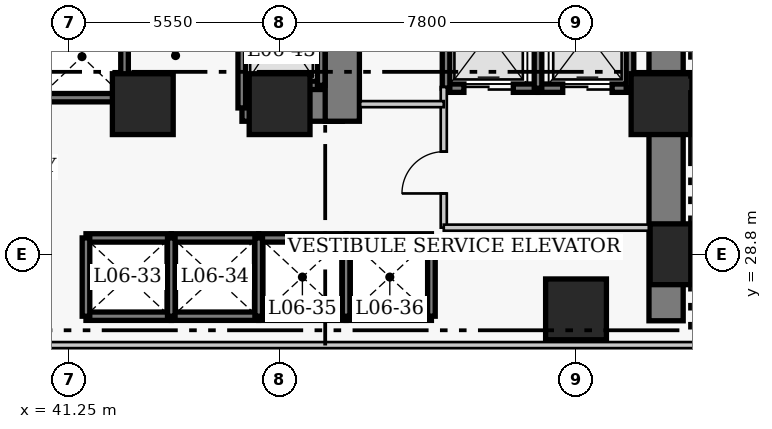
"""IFC4 building model, lengths in metres.
Left out: names, types, materials, properties, quantities, classifications, styles, units other than length and angle.
Written with IfcOpenShell. Run it as: python <this file> out.ifc"""

import sys

from ifc_helpers import new_model, si_unit, direction, frame, frame_2d, origin, origin_2d, place, context, subcontext, project, spatial, rectangle, extrude, element, fill, save


model = new_model("IFC4")
c1 = context("Model", 3, precision=1e-05, world=origin(), true_north=direction((0.0, 1.0)))
c2 = subcontext(c1, "Body", "Model", "MODEL_VIEW")
j1 = project(units=[si_unit("LENGTHUNIT", "METRE"), si_unit("PLANEANGLEUNIT", "RADIAN")], contexts=[c1])
p1 = place(None, origin())
s1 = spatial("IfcSite", under=j1, at=p1, CompositionType="ELEMENT")
p2 = place(p1, origin())
s2 = spatial("IfcBuilding", under=s1, at=p2, CompositionType="ELEMENT")
p3 = place(p2, frame((0.0, 0.0, 29.8)))
s3 = spatial("IfcBuildingStorey", under=s2, at=p3, CompositionType="ELEMENT", Elevation=29.8)
p4 = place(p3, frame((56.97, 27.05, 0.0), z_axis=(0.0, 0.0, 1.0), x_axis=(0.0, 1.0, 0.0)))
e1 = element("IfcWall", 1, at=p4, inside=s3, PredefinedType="SHEAR", context=c2, shape_type="SweptSolid", body=[
    extrude(rectangle(XDim=13.72, YDim=0.9, at=frame_2d((6.86, 0.0))), origin(), (0.0, 0.0, 1.0), 3.8),
])
p5 = place(p3, frame((45.81, 32.75, 0.0), z_axis=(0.0, 0.0, 1.0), x_axis=(1.0, 0.0, 0.0)))
e2 = element("IfcWall", 2, at=p5, inside=s3, PredefinedType="SHEAR", context=c2, shape_type="SweptSolid", body=[
    extrude(rectangle(XDim=2.64, YDim=0.9, at=frame_2d((1.32, 0.0))), origin(), (0.0, 0.0, 1.0), 3.8),
])
p6 = place(p3, frame((48.45, 32.3, 0.0), z_axis=(0.0, 0.0, 1.0), x_axis=(0.0, 1.0, 0.0)))
e3 = element("IfcWall", 3, at=p6, inside=s3, PredefinedType="SHEAR", context=c2, shape_type="SweptSolid", body=[
    extrude(rectangle(XDim=8.02, YDim=0.9, at=frame_2d((4.01, 0.0))), origin(), (0.0, 0.0, 1.0), 3.8),
])
p7 = place(p6, frame((5.9, 0.0, 0.0)))
e4 = element("IfcOpeningElement", 4, at=p7, cuts=e3, PredefinedType="OPENING", context=c2, shape_type="SweptSolid", body=[
    extrude(rectangle(XDim=1.1, YDim=2.15, at=frame_2d((0.55, 1.075))), frame((0.0, 0.46, 0.0), z_axis=(0.0, -1.0, 0.0), x_axis=(1.0, 0.0, 0.0)), (0.0, 0.0, 1.0), 0.92),
])
for number, where, z_axis, x_axis in (
    (5, (57.35, 28.8, 0.0), (0.0, 0.0, 1.0), (1.0, 0.0, 0.0)),
    (6, (43.2, 32.75, 0.0), (0.0, 0.0, 1.0), (1.0, 0.0, 0.0)),
    (7, (46.8, 32.75, 0.0), (0.0, 0.0, 1.0), (1.0, 0.0, 0.0)),
    (8, (54.6, 27.35, 0.0), (0.0, 0.0, 1.0), (1.0, 0.0, 0.0)),
    (9, (56.85, 32.75, 0.0), (0.0, 0.0, 1.0), (1.0, 0.0, 0.0)),
):
    element("IfcColumn", number, at=place(p3, frame(where, z_axis=z_axis, x_axis=x_axis)), inside=s3, PredefinedType="COLUMN", context=c2, shape_type="SweptSolid", body=[
        extrude(rectangle(XDim=1.6, YDim=1.6, at=origin_2d()), origin(), (0.0, 0.0, 1.0), 3.8),
    ])
for number, where, z_axis, x_axis in (
    (10, (41.705, 29.23, 0.0), (0.0, 0.0, 1.0), (1.0, 0.0, 0.0)),
    (11, (41.705, 27.17, 0.0), (0.0, 0.0, 1.0), (1.0, 0.0, 0.0)),
):
    element("IfcWall", number, at=place(p3, frame(where, z_axis=z_axis, x_axis=x_axis)), inside=s3, PredefinedType="SHEAR", context=c2, shape_type="SweptSolid", body=[
        extrude(rectangle(XDim=2.245, YDim=0.22, at=frame_2d((1.123, 0.0))), origin(), (0.0, 0.0, 1.0), 3.8),
    ])
p8 = place(p3, frame((41.705, 27.17, 0.0), z_axis=(0.0, 0.0, 1.0), x_axis=(0.0, 1.0, 0.0)))
e12 = element("IfcWall", 12, at=p8, inside=s3, PredefinedType="SHEAR", context=c2, shape_type="SweptSolid", body=[
    extrude(rectangle(XDim=2.06, YDim=0.2, at=frame_2d((1.03, 0.0))), origin(), (0.0, 0.0, 1.0), 3.8),
])
for number, where, z_axis, x_axis in (
    (13, (43.95, 29.23, 0.0), (0.0, 0.0, 1.0), (1.0, 0.0, 0.0)),
    (14, (43.95, 27.17, 0.0), (0.0, 0.0, 1.0), (1.0, 0.0, 0.0)),
):
    element("IfcWall", number, at=place(p3, frame(where, z_axis=z_axis, x_axis=x_axis)), inside=s3, PredefinedType="SHEAR", context=c2, shape_type="SweptSolid", body=[
        extrude(rectangle(XDim=2.3, YDim=0.22, at=frame_2d((1.15, 0.0))), origin(), (0.0, 0.0, 1.0), 3.8),
    ])
p9 = place(p3, frame((43.95, 27.17, 0.0), z_axis=(0.0, 0.0, 1.0), x_axis=(0.0, 1.0, 0.0)))
e15 = element("IfcWall", 15, at=p9, inside=s3, PredefinedType="SHEAR", context=c2, shape_type="SweptSolid", body=[
    extrude(rectangle(XDim=2.06, YDim=0.2, at=frame_2d((1.03, 0.0))), origin(), (0.0, 0.0, 1.0), 3.8),
])
for number, where, z_axis, x_axis in (
    (16, (46.25, 29.23, 0.0), (0.0, 0.0, 1.0), (1.0, 0.0, 0.0)),
    (17, (46.25, 27.17, 0.0), (0.0, 0.0, 1.0), (1.0, 0.0, 0.0)),
):
    element("IfcWall", number, at=place(p3, frame(where, z_axis=z_axis, x_axis=x_axis)), inside=s3, PredefinedType="SHEAR", context=c2, shape_type="SweptSolid", body=[
        extrude(rectangle(XDim=2.3, YDim=0.22, at=frame_2d((1.15, 0.0))), origin(), (0.0, 0.0, 1.0), 3.8),
    ])
p10 = place(p3, frame((46.25, 27.17, 0.0), z_axis=(0.0, 0.0, 1.0), x_axis=(0.0, 1.0, 0.0)))
e18 = element("IfcWall", 18, at=p10, inside=s3, PredefinedType="SHEAR", context=c2, shape_type="SweptSolid", body=[
    extrude(rectangle(XDim=2.06, YDim=0.2, at=frame_2d((1.03, 0.0))), origin(), (0.0, 0.0, 1.0), 3.8),
])
for number, where, z_axis, x_axis in (
    (19, (48.55, 29.23, 0.0), (0.0, 0.0, 1.0), (1.0, 0.0, 0.0)),
    (20, (48.55, 27.17, 0.0), (0.0, 0.0, 1.0), (1.0, 0.0, 0.0)),
):
    element("IfcWall", number, at=place(p3, frame(where, z_axis=z_axis, x_axis=x_axis)), inside=s3, PredefinedType="SHEAR", context=c2, shape_type="SweptSolid", body=[
        extrude(rectangle(XDim=2.245, YDim=0.22, at=frame_2d((1.123, 0.0))), origin(), (0.0, 0.0, 1.0), 3.8),
    ])
for number, where, z_axis, x_axis in (
    (21, (48.55, 27.17, 0.0), (0.0, 0.0, 1.0), (0.0, 1.0, 0.0)),
    (22, (50.795, 27.17, 0.0), (0.0, 0.0, 1.0), (0.0, 1.0, 0.0)),
):
    element("IfcWall", number, at=place(p3, frame(where, z_axis=z_axis, x_axis=x_axis)), inside=s3, PredefinedType="SHEAR", context=c2, shape_type="SweptSolid", body=[
        extrude(rectangle(XDim=2.06, YDim=0.2, at=frame_2d((1.03, 0.0))), origin(), (0.0, 0.0, 1.0), 3.8),
    ])
p11 = place(p3, frame((40.4, 32.92, 0.0), z_axis=(0.0, 0.0, 1.0), x_axis=(1.0, 0.0, 0.0)))
e23 = element("IfcWall", 23, at=p11, inside=s3, PredefinedType="SHEAR", context=c2, shape_type="SweptSolid", body=[
    extrude(rectangle(XDim=2.32, YDim=0.22, at=frame_2d((1.16, 0.0))), origin(), (0.0, 0.0, 1.0), 3.8),
])
p12 = place(p3, frame((42.72, 32.92, 0.0), z_axis=(0.0, 0.0, 1.0), x_axis=(0.0, 1.0, 0.0)))
e24 = element("IfcWall", 24, at=p12, inside=s3, PredefinedType="SHEAR", context=c2, shape_type="SweptSolid", body=[
    extrude(rectangle(XDim=2.16, YDim=0.2, at=frame_2d((1.08, 0.0))), origin(), (0.0, 0.0, 1.0), 3.8),
])
p13 = place(p3, frame((51.18, 33.17, 0.0), z_axis=(0.0, 0.0, 1.0), x_axis=(1.0, 0.0, 0.0)))
e25 = element("IfcWall", 25, at=p13, inside=s3, PredefinedType="SHEAR", context=c2, shape_type="SweptSolid", body=[
    extrude(rectangle(XDim=2.42, YDim=0.22, at=frame_2d((1.21, 0.0))), origin(), (0.0, 0.0, 1.0), 3.8),
])
p14 = place(p13, frame((0.47, 0.0, 0.0)))
e26 = element("IfcOpeningElement", 26, at=p14, cuts=e25, PredefinedType="OPENING", context=c2, shape_type="SweptSolid", body=[
    extrude(rectangle(XDim=1.3, YDim=2.15, at=frame_2d((0.65, 1.075))), frame((0.0, 0.12, 0.0), z_axis=(0.0, -1.0, 0.0), x_axis=(1.0, 0.0, 0.0)), (0.0, 0.0, 1.0), 0.24),
])
p15 = place(p3, frame((51.18, 33.17, 0.0), z_axis=(0.0, 0.0, 1.0), x_axis=(0.0, 1.0, 0.0)))
e27 = element("IfcWall", 27, at=p15, inside=s3, PredefinedType="SHEAR", context=c2, shape_type="SweptSolid", body=[
    extrude(rectangle(XDim=2.86, YDim=0.2, at=frame_2d((1.43, 0.0))), origin(), (0.0, 0.0, 1.0), 3.8),
])
p16 = place(p3, frame((53.6, 33.17, 0.0), z_axis=(0.0, 0.0, 1.0), x_axis=(1.0, 0.0, 0.0)))
e28 = element("IfcWall", 28, at=p16, inside=s3, PredefinedType="SHEAR", context=c2, shape_type="SweptSolid", body=[
    extrude(rectangle(XDim=2.42, YDim=0.22, at=frame_2d((1.21, 0.0))), origin(), (0.0, 0.0, 1.0), 3.8),
])
p17 = place(p16, frame((0.65, 0.0, 0.0)))
e29 = element("IfcOpeningElement", 29, at=p17, cuts=e28, PredefinedType="OPENING", context=c2, shape_type="SweptSolid", body=[
    extrude(rectangle(XDim=1.3, YDim=2.15, at=frame_2d((0.65, 1.075))), frame((0.0, 0.12, 0.0), z_axis=(0.0, -1.0, 0.0), x_axis=(1.0, 0.0, 0.0)), (0.0, 0.0, 1.0), 0.24),
])
for number, where, z_axis, x_axis in (
    (30, (53.6, 33.17, 0.0), (0.0, 0.0, 1.0), (0.0, 1.0, 0.0)),
    (31, (56.02, 33.17, 0.0), (0.0, 0.0, 1.0), (0.0, 1.0, 0.0)),
):
    element("IfcWall", number, at=place(p3, frame(where, z_axis=z_axis, x_axis=x_axis)), inside=s3, PredefinedType="SHEAR", context=c2, shape_type="SweptSolid", body=[
        extrude(rectangle(XDim=2.86, YDim=0.2, at=frame_2d((1.43, 0.0))), origin(), (0.0, 0.0, 1.0), 3.8),
    ])
p18 = place(p3, frame((45.805, 33.245, 0.0), z_axis=(0.0, 0.0, 1.0), x_axis=(1.0, 0.0, 0.0)))
e32 = element("IfcWall", 32, at=p18, inside=s3, PredefinedType="SHEAR", context=c2, shape_type="SweptSolid", body=[
    extrude(rectangle(XDim=2.09, YDim=0.22, at=frame_2d((1.045, 0.0))), origin(), (0.0, 0.0, 1.0), 3.8),
])
p19 = place(p3, frame((45.805, 32.65, 0.0), z_axis=(0.0, 0.0, 1.0), x_axis=(0.0, 1.0, 0.0)))
e33 = element("IfcWall", 33, at=p19, inside=s3, PredefinedType="SHEAR", context=c2, shape_type="SweptSolid", body=[
    extrude(rectangle(XDim=3.505, YDim=0.2, at=frame_2d((1.752, 0.0))), origin(), (0.0, 0.0, 1.0), 3.8),
])
p20 = place(p3, frame((47.895, 33.245, 0.0), z_axis=(0.0, 0.0, 1.0), x_axis=(0.0, 1.0, 0.0)))
e34 = element("IfcWall", 34, at=p20, inside=s3, PredefinedType="SHEAR", context=c2, shape_type="SweptSolid", body=[
    extrude(rectangle(XDim=2.91, YDim=0.2, at=frame_2d((1.455, 0.0))), origin(), (0.0, 0.0, 1.0), 3.8),
])
p21 = place(p3, frame((51.12, 29.5, 0.0), z_axis=(0.0, 0.0, 1.0), x_axis=(0.0, 1.0, 0.0)))
e35 = element("IfcWall", 35, at=p21, inside=s3, PredefinedType="PARTITIONING", context=c2, shape_type="SweptSolid", body=[
    extrude(rectangle(XDim=3.7, YDim=0.16, at=frame_2d((1.85, 0.0))), origin(), (0.0, 0.0, 1.0), 3.54),
])
p22 = place(p21, frame((0.9, 0.0, 0.0)))
e36 = element("IfcOpeningElement", 36, at=p22, cuts=e35, PredefinedType="OPENING", context=c2, shape_type="SweptSolid", body=[
    extrude(rectangle(XDim=1.1, YDim=2.15, at=frame_2d((0.55, 1.075))), frame((0.0, 0.09, 0.0), z_axis=(0.0, -1.0, 0.0), x_axis=(1.0, 0.0, 0.0)), (0.0, 0.0, 1.0), 0.18),
])
p23 = place(p3, frame((51.12, 29.5, 0.0), z_axis=(0.0, 0.0, 1.0), x_axis=(1.0, 0.0, 0.0)))
e37 = element("IfcWall", 37, at=p23, inside=s3, PredefinedType="PARTITIONING", context=c2, shape_type="SweptSolid", body=[
    extrude(rectangle(XDim=5.63, YDim=0.16, at=frame_2d((2.815, 0.0))), origin(), (0.0, 0.0, 1.0), 3.54),
])
p24 = place(p3, frame((48.92, 32.75, 0.0), z_axis=(0.0, 0.0, 1.0), x_axis=(1.0, 0.0, 0.0)))
e38 = element("IfcWall", 38, at=p24, inside=s3, PredefinedType="PARTITIONING", context=c2, shape_type="SweptSolid", body=[
    extrude(rectangle(XDim=2.2, YDim=0.16, at=frame_2d((1.1, 0.0))), origin(), (0.0, 0.0, 1.0), 3.54),
])
p25 = place(p3, frame((35.85, 26.41, 0.0), z_axis=(0.0, 0.0, 1.0), x_axis=(1.0, 0.0, 0.0)))
e39 = element("IfcWall", 39, at=p25, inside=s3, PredefinedType="PARTITIONING", context=c2, shape_type="SweptSolid", body=[
    extrude(rectangle(XDim=22.8, YDim=0.16, at=frame_2d((11.4, 0.0))), origin(), (0.0, 0.0, 1.0), 3.54),
])
p26 = place(p14, origin())
e40 = element("IfcDoor", 40, at=p26, inside=s3, OperationType="DOUBLE_DOOR_SLIDING", PredefinedType="DOOR", context=c2, shape_type="SweptSolid", body=[
    extrude(rectangle(XDim=1.3, YDim=2.15, at=frame_2d((0.65, 1.075))), frame((0.0, 0.025, 0.0), z_axis=(0.0, -1.0, 0.0), x_axis=(1.0, 0.0, 0.0)), (0.0, 0.0, 1.0), 0.05),
])
fill(e26, e40)
p27 = place(p17, origin())
e41 = element("IfcDoor", 41, at=p27, inside=s3, OperationType="DOUBLE_DOOR_SLIDING", PredefinedType="DOOR", context=c2, shape_type="SweptSolid", body=[
    extrude(rectangle(XDim=1.3, YDim=2.15, at=frame_2d((0.65, 1.075))), frame((0.0, 0.025, 0.0), z_axis=(0.0, -1.0, 0.0), x_axis=(1.0, 0.0, 0.0)), (0.0, 0.0, 1.0), 0.05),
])
fill(e29, e41)
p28 = place(p22, origin())
e42 = element("IfcDoor", 42, at=p28, inside=s3, OperationType="SINGLE_SWING_LEFT", PredefinedType="DOOR", context=c2, shape_type="SweptSolid", body=[
    extrude(rectangle(XDim=1.1, YDim=2.15, at=frame_2d((0.55, 1.075))), frame((0.0, 0.025, 0.0), z_axis=(0.0, -1.0, 0.0), x_axis=(1.0, 0.0, 0.0)), (0.0, 0.0, 1.0), 0.05),
])
fill(e36, e42)
save(model, sys.argv[1])
